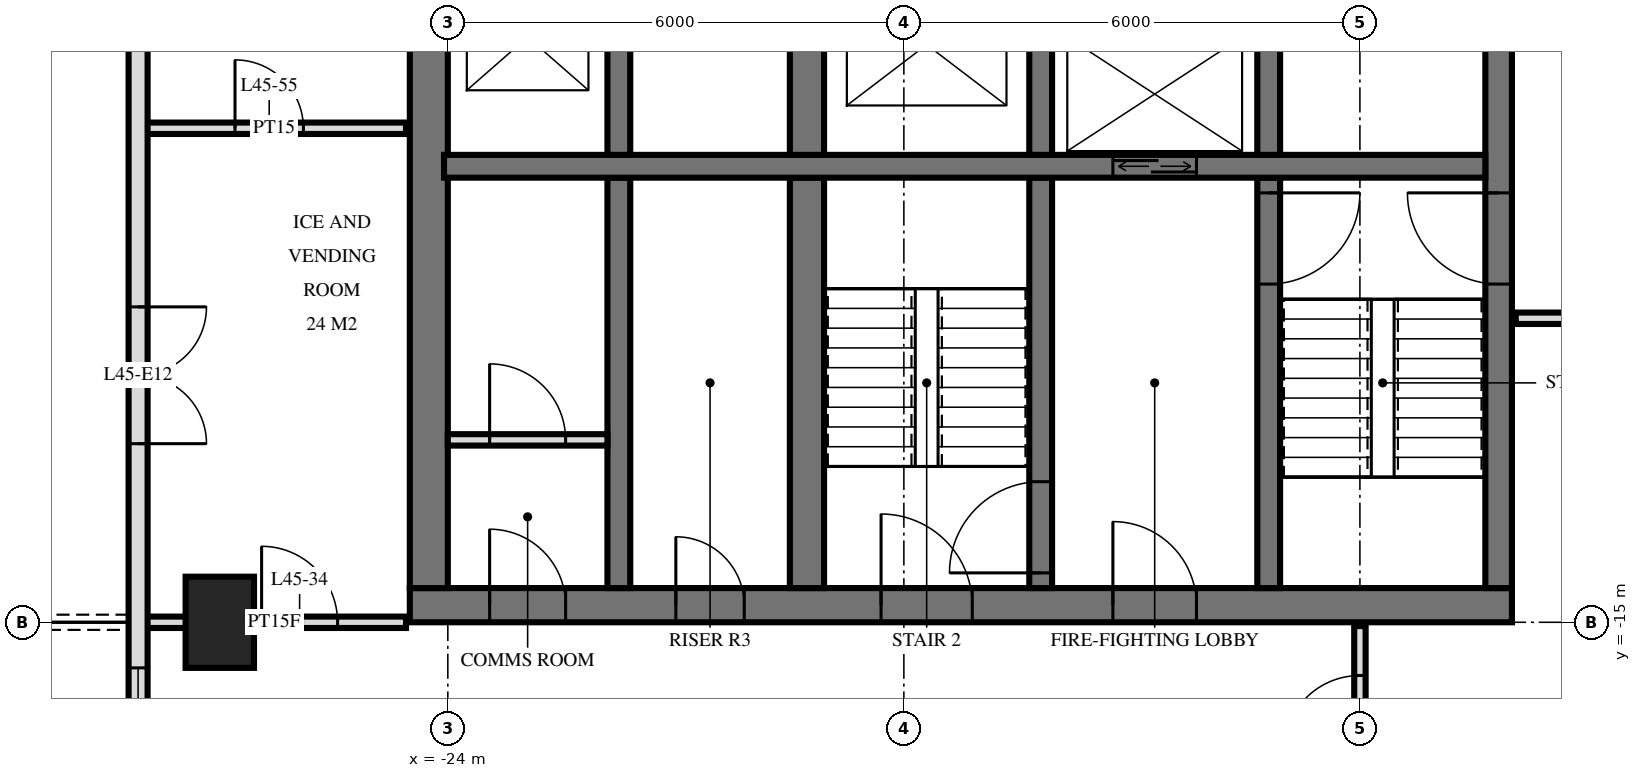
"""IFC4 building model, lengths in metres.
Left out: names, types, materials, properties, quantities, classifications, styles, units other than length and angle.
Written with IfcOpenShell. Run it as: python <this file> out.ifc"""

import sys

from ifc_helpers import new_model, si_unit, direction, frame, frame_2d, origin, origin_2d, place, context, subcontext, project, spatial, rectangle, extrude, element, fill, save


model = new_model("IFC4")
c1 = context("Model", 3, precision=1e-05, world=origin(), true_north=direction((0.0, 1.0)))
c2 = subcontext(c1, "Body", "Model", "MODEL_VIEW")
j1 = project(units=[si_unit("LENGTHUNIT", "METRE"), si_unit("PLANEANGLEUNIT", "RADIAN")], contexts=[c1])
p1 = place(None, origin())
s1 = spatial("IfcSite", under=j1, at=p1, CompositionType="ELEMENT")
p2 = place(p1, origin())
s2 = spatial("IfcBuilding", under=s1, at=p2, CompositionType="ELEMENT")
p3 = place(p2, frame((0.0, 0.0, 174.0)))
s3 = spatial("IfcBuildingStorey", under=s2, at=p3, CompositionType="ELEMENT", Elevation=174.0)
p4 = place(p3, frame((-27.0, -15.0, 0.0), z_axis=(0.0, 0.0, 1.0), x_axis=(0.0, 1.0, 0.0)))
e1 = element("IfcColumn", 1, at=p4, inside=s3, PredefinedType="COLUMN", context=c2, shape_type="SweptSolid", body=[
    extrude(rectangle(XDim=1.2, YDim=0.9, at=origin_2d()), origin(), (0.0, 0.0, 1.0), 3.6),
])
p5 = place(p3, frame((-24.5, -14.775, 0.0), z_axis=(0.0, 0.0, 1.0), x_axis=(1.0, 0.0, 0.0)))
e2 = element("IfcWall", 2, at=p5, inside=s3, PredefinedType="SHEAR", context=c2, shape_type="SweptSolid", body=[
    extrude(rectangle(XDim=14.5, YDim=0.45, at=frame_2d((7.25, 0.0))), origin(), (0.0, 0.0, 1.0), 3.6),
])
p6 = place(p5, frame((6.2, 0.0, 0.0)))
e3 = element("IfcOpeningElement", 3, at=p6, cuts=e2, PredefinedType="OPENING", context=c2, shape_type="SweptSolid", body=[
    extrude(rectangle(XDim=1.2, YDim=2.1, at=frame_2d((0.6, 1.05))), frame((0.0, 0.235, 0.0), z_axis=(0.0, -1.0, 0.0), x_axis=(1.0, 0.0, 0.0)), (0.0, 0.0, 1.0), 0.47),
])
p7 = place(p5, frame((9.25, 0.0, 0.0)))
e4 = element("IfcOpeningElement", 4, at=p7, cuts=e2, PredefinedType="OPENING", context=c2, shape_type="SweptSolid", body=[
    extrude(rectangle(XDim=1.1, YDim=2.1, at=frame_2d((0.55, 1.05))), frame((0.0, 0.235, 0.0), z_axis=(0.0, -1.0, 0.0), x_axis=(1.0, 0.0, 0.0)), (0.0, 0.0, 1.0), 0.47),
])
p8 = place(p5, frame((3.5, 0.0, 0.0)))
e5 = element("IfcOpeningElement", 5, at=p8, cuts=e2, PredefinedType="OPENING", context=c2, shape_type="SweptSolid", body=[
    extrude(rectangle(XDim=0.9, YDim=2.1, at=frame_2d((0.45, 1.05))), frame((0.0, 0.235, 0.0), z_axis=(0.0, -1.0, 0.0), x_axis=(1.0, 0.0, 0.0)), (0.0, 0.0, 1.0), 0.47),
])
p9 = place(p5, frame((1.05, 0.0, 0.0)))
e6 = element("IfcOpeningElement", 6, at=p9, cuts=e2, PredefinedType="OPENING", context=c2, shape_type="SweptSolid", body=[
    extrude(rectangle(XDim=1.0, YDim=2.1, at=frame_2d((0.5, 1.05))), frame((0.0, 0.235, 0.0), z_axis=(0.0, -1.0, 0.0), x_axis=(1.0, 0.0, 0.0)), (0.0, 0.0, 1.0), 0.47),
])
p10 = place(p3, frame((-10.175, -14.55, 0.0), z_axis=(0.0, 0.0, 1.0), x_axis=(0.0, 1.0, 0.0)))
e7 = element("IfcWall", 7, at=p10, inside=s3, PredefinedType="SHEAR", context=c2, shape_type="SweptSolid", body=[
    extrude(rectangle(XDim=14.1, YDim=0.35, at=frame_2d((7.05, 0.0))), origin(), (0.0, 0.0, 1.0), 3.6),
])
p11 = place(p10, frame((8.4, 0.0, 0.0)))
e8 = element("IfcOpeningElement", 8, at=p11, cuts=e7, PredefinedType="OPENING", context=c2, shape_type="SweptSolid", body=[
    extrude(rectangle(XDim=1.4, YDim=2.4, at=frame_2d((0.7, 1.2))), frame((0.0, 0.185, 0.0), z_axis=(0.0, -1.0, 0.0), x_axis=(1.0, 0.0, 0.0)), (0.0, 0.0, 1.0), 0.37),
])
p12 = place(p10, frame((10.0, 0.0, 0.0)))
e9 = element("IfcOpeningElement", 9, at=p12, cuts=e7, PredefinedType="OPENING", context=c2, shape_type="SweptSolid", body=[
    extrude(rectangle(XDim=1.4, YDim=2.4, at=frame_2d((0.7, 1.2))), frame((0.0, 0.185, 0.0), z_axis=(0.0, -1.0, 0.0), x_axis=(1.0, 0.0, 0.0)), (0.0, 0.0, 1.0), 0.37),
])
p13 = place(p10, frame((4.0, 0.0, 0.0)))
e10 = element("IfcOpeningElement", 10, at=p13, cuts=e7, PredefinedType="OPENING", context=c2, shape_type="SweptSolid", body=[
    extrude(rectangle(XDim=1.2, YDim=2.1, at=frame_2d((0.6, 1.05))), frame((0.0, 0.185, 0.0), z_axis=(0.0, -1.0, 0.0), x_axis=(1.0, 0.0, 0.0)), (0.0, 0.0, 1.0), 0.37),
])
p14 = place(p3, frame((-24.25, -14.55, 0.0), z_axis=(0.0, 0.0, 1.0), x_axis=(0.0, 1.0, 0.0)))
e11 = element("IfcWall", 11, at=p14, inside=s3, PredefinedType="SHEAR", context=c2, shape_type="SweptSolid", body=[
    extrude(rectangle(XDim=14.1, YDim=0.5, at=frame_2d((7.05, 0.0))), origin(), (0.0, 0.0, 1.0), 3.6),
])
p15 = place(p3, frame((-24.05, -9.0, 0.0), z_axis=(0.0, 0.0, 1.0), x_axis=(1.0, 0.0, 0.0)))
e12 = element("IfcWall", 12, at=p15, inside=s3, PredefinedType="SHEAR", context=c2, shape_type="SweptSolid", body=[
    extrude(rectangle(XDim=13.7, YDim=0.3, at=frame_2d((6.85, 0.0))), origin(), (0.0, 0.0, 1.0), 3.6),
])
p16 = place(p15, frame((8.8, 0.0, 0.0)))
e13 = element("IfcOpeningElement", 13, at=p16, cuts=e12, PredefinedType="OPENING", context=c2, shape_type="SweptSolid", body=[
    extrude(rectangle(XDim=1.1, YDim=2.1, at=frame_2d((0.55, 1.05))), frame((0.0, 0.16, 0.0), z_axis=(0.0, -1.0, 0.0), x_axis=(1.0, 0.0, 0.0)), (0.0, 0.0, 1.0), 0.32),
])
p17 = place(p3, frame((-13.2, -8.85, 0.0), z_axis=(0.0, 0.0, 1.0), x_axis=(0.0, 1.0, 0.0)))
e14 = element("IfcWall", 14, at=p17, inside=s3, PredefinedType="SHEAR", context=c2, shape_type="SweptSolid", body=[
    extrude(rectangle(XDim=2.3, YDim=0.3, at=frame_2d((1.15, 0.0))), origin(), (0.0, 0.0, 1.0), 3.6),
])
p18 = place(p3, frame((-13.2, -14.55, 0.0), z_axis=(0.0, 0.0, 1.0), x_axis=(0.0, 1.0, 0.0)))
e15 = element("IfcWall", 15, at=p18, inside=s3, PredefinedType="SHEAR", context=c2, shape_type="SweptSolid", body=[
    extrude(rectangle(XDim=5.4, YDim=0.3, at=frame_2d((2.7, 0.0))), origin(), (0.0, 0.0, 1.0), 3.6),
])
p19 = place(p18, frame((4.0, 0.0, 0.0)))
e16 = element("IfcOpeningElement", 16, at=p19, cuts=e15, PredefinedType="OPENING", context=c2, shape_type="SweptSolid", body=[
    extrude(rectangle(XDim=1.2, YDim=2.1, at=frame_2d((0.6, 1.05))), frame((0.0, 0.16, 0.0), z_axis=(0.0, -1.0, 0.0), x_axis=(1.0, 0.0, 0.0)), (0.0, 0.0, 1.0), 0.32),
])
p20 = place(p3, frame((-16.2, -8.85, 0.0), z_axis=(0.0, 0.0, 1.0), x_axis=(0.0, 1.0, 0.0)))
e17 = element("IfcWall", 17, at=p20, inside=s3, PredefinedType="SHEAR", context=c2, shape_type="SweptSolid", body=[
    extrude(rectangle(XDim=2.3, YDim=0.3, at=frame_2d((1.15, 0.0))), origin(), (0.0, 0.0, 1.0), 3.6),
])
p21 = place(p3, frame((-16.2, -14.55, 0.0), z_axis=(0.0, 0.0, 1.0), x_axis=(0.0, 1.0, 0.0)))
e18 = element("IfcWall", 18, at=p21, inside=s3, PredefinedType="SHEAR", context=c2, shape_type="SweptSolid", body=[
    extrude(rectangle(XDim=5.4, YDim=0.3, at=frame_2d((2.7, 0.0))), origin(), (0.0, 0.0, 1.0), 3.6),
])
p22 = place(p21, frame((0.2, 0.0, 0.0)))
e19 = element("IfcOpeningElement", 19, at=p22, cuts=e18, PredefinedType="OPENING", context=c2, shape_type="SweptSolid", body=[
    extrude(rectangle(XDim=1.2, YDim=2.1, at=frame_2d((0.6, 1.05))), frame((0.0, 0.16, 0.0), z_axis=(0.0, -1.0, 0.0), x_axis=(1.0, 0.0, 0.0)), (0.0, 0.0, 1.0), 0.32),
])
p23 = place(p3, frame((-19.275, -8.85, 0.0), z_axis=(0.0, 0.0, 1.0), x_axis=(0.0, 1.0, 0.0)))
e20 = element("IfcWall", 20, at=p23, inside=s3, PredefinedType="SHEAR", context=c2, shape_type="SweptSolid", body=[
    extrude(rectangle(XDim=2.3, YDim=0.45, at=frame_2d((1.15, 0.0))), origin(), (0.0, 0.0, 1.0), 3.6),
])
p24 = place(p3, frame((-19.275, -14.55, 0.0), z_axis=(0.0, 0.0, 1.0), x_axis=(0.0, 1.0, 0.0)))
e21 = element("IfcWall", 21, at=p24, inside=s3, PredefinedType="SHEAR", context=c2, shape_type="SweptSolid", body=[
    extrude(rectangle(XDim=5.4, YDim=0.45, at=frame_2d((2.7, 0.0))), origin(), (0.0, 0.0, 1.0), 3.6),
])
p25 = place(p3, frame((-21.75, -8.85, 0.0), z_axis=(0.0, 0.0, 1.0), x_axis=(0.0, 1.0, 0.0)))
e22 = element("IfcWall", 22, at=p25, inside=s3, PredefinedType="SHEAR", context=c2, shape_type="SweptSolid", body=[
    extrude(rectangle(XDim=2.3, YDim=0.3, at=frame_2d((1.15, 0.0))), origin(), (0.0, 0.0, 1.0), 3.6),
])
p26 = place(p3, frame((-21.75, -14.55, 0.0), z_axis=(0.0, 0.0, 1.0), x_axis=(0.0, 1.0, 0.0)))
e23 = element("IfcWall", 23, at=p26, inside=s3, PredefinedType="SHEAR", context=c2, shape_type="SweptSolid", body=[
    extrude(rectangle(XDim=5.4, YDim=0.3, at=frame_2d((2.7, 0.0))), origin(), (0.0, 0.0, 1.0), 3.6),
])
p27 = place(p3, frame((-28.075, -3.325, 0.0), z_axis=(0.0, 0.0, 1.0), x_axis=(0.0, -1.0, 0.0)))
e24 = element("IfcWall", 24, at=p27, inside=s3, PredefinedType="SOLIDWALL", context=c2, shape_type="SweptSolid", body=[
    extrude(rectangle(XDim=25.951, YDim=0.25, at=frame_2d((12.975, 0.0))), origin(), (0.0, 0.0, 1.0), 3.3),
])
p28 = place(p27, frame((7.525, 0.0, 0.0)))
e25 = element("IfcOpeningElement", 25, at=p28, cuts=e24, PredefinedType="OPENING", context=c2, shape_type="SweptSolid", body=[
    extrude(rectangle(XDim=1.8, YDim=2.4, at=frame_2d((0.9, 1.2))), frame((0.0, 0.135, 0.0), z_axis=(0.0, -1.0, 0.0), x_axis=(1.0, 0.0, 0.0)), (0.0, 0.0, 1.0), 0.27),
])
p29 = place(p27, frame((12.275, 0.0, 0.3)))
e26 = element("IfcOpeningElement", 26, at=p29, cuts=e24, PredefinedType="OPENING", context=c2, shape_type="SweptSolid", body=[
    extrude(rectangle(XDim=1.2, YDim=2.1, at=frame_2d((0.6, 1.05))), frame((0.0, 0.135, 0.0), z_axis=(0.0, -1.0, 0.0), x_axis=(1.0, 0.0, 0.0)), (0.0, 0.0, 1.0), 0.27),
])
p30 = place(p27, frame((14.975, 0.0, 0.3)))
e27 = element("IfcOpeningElement", 27, at=p30, cuts=e24, PredefinedType="OPENING", context=c2, shape_type="SweptSolid", body=[
    extrude(rectangle(XDim=2.4, YDim=2.1, at=frame_2d((1.2, 1.05))), frame((0.0, 0.135, 0.0), z_axis=(0.0, -1.0, 0.0), x_axis=(1.0, 0.0, 0.0)), (0.0, 0.0, 1.0), 0.27),
])
p31 = place(p27, frame((18.175, 0.0, 0.0)))
e28 = element("IfcOpeningElement", 28, at=p31, cuts=e24, PredefinedType="OPENING", context=c2, shape_type="SweptSolid", body=[
    extrude(rectangle(XDim=1.8, YDim=2.4, at=frame_2d((0.9, 1.2))), frame((0.0, 0.135, 0.0), z_axis=(0.0, -1.0, 0.0), x_axis=(1.0, 0.0, 0.0)), (0.0, 0.0, 1.0), 0.27),
])
p32 = place(p27, frame((21.075, 0.0, 0.0)))
e29 = element("IfcOpeningElement", 29, at=p32, cuts=e24, PredefinedType="OPENING", context=c2, shape_type="SweptSolid", body=[
    extrude(rectangle(XDim=1.8, YDim=2.4, at=frame_2d((0.9, 1.2))), frame((0.0, 0.135, 0.0), z_axis=(0.0, -1.0, 0.0), x_axis=(1.0, 0.0, 0.0)), (0.0, 0.0, 1.0), 0.27),
])
p33 = place(p27, frame((23.825, 0.0, 0.3)))
e30 = element("IfcOpeningElement", 30, at=p33, cuts=e24, PredefinedType="OPENING", context=c2, shape_type="SweptSolid", body=[
    extrude(rectangle(XDim=1.8, YDim=2.1, at=frame_2d((0.9, 1.05))), frame((0.0, 0.135, 0.0), z_axis=(0.0, -1.0, 0.0), x_axis=(1.0, 0.0, 0.0)), (0.0, 0.0, 1.0), 0.27),
])
p34 = place(p3, frame((-24.0, -12.6, 0.0), z_axis=(0.0, 0.0, 1.0), x_axis=(1.0, 0.0, 0.0)))
e31 = element("IfcWall", 31, at=p34, inside=s3, PredefinedType="PARTITIONING", context=c2, shape_type="SweptSolid", body=[
    extrude(rectangle(XDim=2.1, YDim=0.15, at=frame_2d((1.05, 0.0))), origin(), (0.0, 0.0, 1.0), 3.3),
])
p35 = place(p34, frame((0.55, 0.0, 0.0)))
e32 = element("IfcOpeningElement", 32, at=p35, cuts=e31, PredefinedType="OPENING", context=c2, shape_type="SweptSolid", body=[
    extrude(rectangle(XDim=1.0, YDim=2.1, at=frame_2d((0.5, 1.05))), frame((0.0, 0.085, 0.0), z_axis=(0.0, -1.0, 0.0), x_axis=(1.0, 0.0, 0.0)), (0.0, 0.0, 1.0), 0.17),
])
p36 = place(p3, frame((-12.0, -17.4, 0.0), z_axis=(0.0, 0.0, 1.0), x_axis=(0.0, 1.0, 0.0)))
e33 = element("IfcWall", 33, at=p36, inside=s3, PredefinedType="PARTITIONING", context=c2, shape_type="SweptSolid", body=[
    extrude(rectangle(XDim=2.35, YDim=0.15, at=frame_2d((1.175, 0.0))), origin(), (0.0, 0.0, 1.0), 3.32),
])
p37 = place(p36, frame((0.7, 0.0, 0.0)))
e34 = element("IfcOpeningElement", 34, at=p37, cuts=e33, PredefinedType="OPENING", context=c2, shape_type="SweptSolid", body=[
    extrude(rectangle(XDim=1.0, YDim=2.1, at=frame_2d((0.5, 1.05))), frame((0.0, 0.085, 0.0), z_axis=(0.0, -1.0, 0.0), x_axis=(1.0, 0.0, 0.0)), (0.0, 0.0, 1.0), 0.17),
])
p38 = place(p3, frame((-28.02, -15.0, 0.0), z_axis=(0.0, 0.0, 1.0), x_axis=(1.0, 0.0, 0.0)))
e35 = element("IfcWall", 35, at=p38, inside=s3, PredefinedType="PARTITIONING", context=c2, shape_type="SweptSolid", body=[
    extrude(rectangle(XDim=3.47, YDim=0.15, at=frame_2d((1.735, 0.0))), origin(), (0.0, 0.0, 1.0), 3.32),
])
p39 = place(p38, frame((1.57, 0.0, 0.0)))
e36 = element("IfcOpeningElement", 36, at=p39, cuts=e35, PredefinedType="OPENING", context=c2, shape_type="SweptSolid", body=[
    extrude(rectangle(XDim=1.0, YDim=2.1, at=frame_2d((0.5, 1.05))), frame((0.0, 0.085, 0.0), z_axis=(0.0, -1.0, 0.0), x_axis=(1.0, 0.0, 0.0)), (0.0, 0.0, 1.0), 0.17),
])
p40 = place(p3, frame((-9.95, -11.0, 0.0), z_axis=(0.0, 0.0, 1.0), x_axis=(1.0, 0.0, 0.0)))
e37 = element("IfcWall", 37, at=p40, inside=s3, PredefinedType="PARTITIONING", context=c2, shape_type="SweptSolid", body=[
    extrude(rectangle(XDim=19.9, YDim=0.15, at=frame_2d((9.95, 0.0))), origin(), (0.0, 0.0, 1.0), 3.32),
])
p41 = place(p40, frame((9.45, 0.0, 0.0)))
e38 = element("IfcOpeningElement", 38, at=p41, cuts=e37, PredefinedType="OPENING", context=c2, shape_type="SweptSolid", body=[
    extrude(rectangle(XDim=1.0, YDim=2.1, at=frame_2d((0.5, 1.05))), frame((0.0, 0.085, 0.0), z_axis=(0.0, -1.0, 0.0), x_axis=(1.0, 0.0, 0.0)), (0.0, 0.0, 1.0), 0.17),
])
p42 = place(p40, frame((3.45, 0.0, 0.0)))
e39 = element("IfcOpeningElement", 39, at=p42, cuts=e37, PredefinedType="OPENING", context=c2, shape_type="SweptSolid", body=[
    extrude(rectangle(XDim=1.0, YDim=2.1, at=frame_2d((0.5, 1.05))), frame((0.0, 0.085, 0.0), z_axis=(0.0, -1.0, 0.0), x_axis=(1.0, 0.0, 0.0)), (0.0, 0.0, 1.0), 0.17),
])
p43 = place(p3, frame((-28.02, -8.5, 0.0), z_axis=(0.0, 0.0, 1.0), x_axis=(1.0, 0.0, 0.0)))
e40 = element("IfcWall", 40, at=p43, inside=s3, PredefinedType="PARTITIONING", context=c2, shape_type="SweptSolid", body=[
    extrude(rectangle(XDim=3.47, YDim=0.15, at=frame_2d((1.735, 0.0))), origin(), (0.0, 0.0, 1.0), 3.32),
])
p44 = place(p43, frame((1.22, 0.0, 0.0)))
e41 = element("IfcOpeningElement", 41, at=p44, cuts=e40, PredefinedType="OPENING", context=c2, shape_type="SweptSolid", body=[
    extrude(rectangle(XDim=0.9, YDim=2.1, at=frame_2d((0.45, 1.05))), frame((0.0, 0.085, 0.0), z_axis=(0.0, -1.0, 0.0), x_axis=(1.0, 0.0, 0.0)), (0.0, 0.0, 1.0), 0.17),
])
p45 = place(p28, origin())
e42 = element("IfcDoor", 42, at=p45, inside=s3, OperationType="DOUBLE_DOOR_SINGLE_SWING", PredefinedType="DOOR", context=c2, shape_type="SweptSolid", body=[
    extrude(rectangle(XDim=1.8, YDim=2.4, at=frame_2d((0.9, 1.2))), frame((0.0, 0.025, 0.0), z_axis=(0.0, -1.0, 0.0), x_axis=(1.0, 0.0, 0.0)), (0.0, 0.0, 1.0), 0.05),
])
fill(e25, e42)
p46 = place(p29, origin())
e43 = element("IfcWindow", 43, at=p46, inside=s3, PartitioningType="SINGLE_PANEL", PredefinedType="WINDOW", context=c2, shape_type="SweptSolid", body=[
    extrude(rectangle(XDim=1.2, YDim=2.1, at=frame_2d((0.6, 1.05))), frame((0.0, 0.03, 0.0), z_axis=(0.0, -1.0, 0.0), x_axis=(1.0, 0.0, 0.0)), (0.0, 0.0, 1.0), 0.06),
])
fill(e26, e43)
p47 = place(p16, origin())
e44 = element("IfcDoor", 44, at=p47, inside=s3, OperationType="DOUBLE_DOOR_SLIDING", PredefinedType="USERDEFINED", context=c2, shape_type="SweptSolid", body=[
    extrude(rectangle(XDim=1.1, YDim=2.1, at=frame_2d((0.55, 1.05))), frame((0.0, 0.025, 0.0), z_axis=(0.0, -1.0, 0.0), x_axis=(1.0, 0.0, 0.0)), (0.0, 0.0, 1.0), 0.05),
])
fill(e13, e44)
p48 = place(p13, origin())
e45 = element("IfcDoor", 45, at=p48, inside=s3, OperationType="SINGLE_SWING_LEFT", PredefinedType="DOOR", context=c2, shape_type="SweptSolid", body=[
    extrude(rectangle(XDim=1.2, YDim=2.1, at=frame_2d((0.6, 1.05))), frame((0.0, 0.025, 0.0), z_axis=(0.0, -1.0, 0.0), x_axis=(1.0, 0.0, 0.0)), (0.0, 0.0, 1.0), 0.05),
])
fill(e10, e45)
p49 = place(p6, origin())
e46 = element("IfcDoor", 46, at=p49, inside=s3, OperationType="SINGLE_SWING_RIGHT", PredefinedType="DOOR", context=c2, shape_type="SweptSolid", body=[
    extrude(rectangle(XDim=1.2, YDim=2.1, at=frame_2d((0.6, 1.05))), frame((0.0, 0.025, 0.0), z_axis=(0.0, -1.0, 0.0), x_axis=(1.0, 0.0, 0.0)), (0.0, 0.0, 1.0), 0.05),
])
fill(e3, e46)
p50 = place(p7, origin())
e47 = element("IfcDoor", 47, at=p50, inside=s3, OperationType="SINGLE_SWING_RIGHT", PredefinedType="DOOR", context=c2, shape_type="SweptSolid", body=[
    extrude(rectangle(XDim=1.1, YDim=2.1, at=frame_2d((0.55, 1.05))), frame((0.0, 0.025, 0.0), z_axis=(0.0, -1.0, 0.0), x_axis=(1.0, 0.0, 0.0)), (0.0, 0.0, 1.0), 0.05),
])
fill(e4, e47)
p51 = place(p8, origin())
e48 = element("IfcDoor", 48, at=p51, inside=s3, OperationType="SINGLE_SWING_RIGHT", PredefinedType="DOOR", context=c2, shape_type="SweptSolid", body=[
    extrude(rectangle(XDim=0.9, YDim=2.1, at=frame_2d((0.45, 1.05))), frame((0.0, 0.025, 0.0), z_axis=(0.0, -1.0, 0.0), x_axis=(1.0, 0.0, 0.0)), (0.0, 0.0, 1.0), 0.05),
])
fill(e5, e48)
p52 = place(p9, origin())
e49 = element("IfcDoor", 49, at=p52, inside=s3, OperationType="SINGLE_SWING_RIGHT", PredefinedType="DOOR", context=c2, shape_type="SweptSolid", body=[
    extrude(rectangle(XDim=1.0, YDim=2.1, at=frame_2d((0.5, 1.05))), frame((0.0, 0.025, 0.0), z_axis=(0.0, -1.0, 0.0), x_axis=(1.0, 0.0, 0.0)), (0.0, 0.0, 1.0), 0.05),
])
fill(e6, e49)
p53 = place(p19, frame((0.6, 0.0, 0.0), z_axis=(0.0, 0.0, 1.0), x_axis=(-1.0, 0.0, 0.0)))
e50 = element("IfcDoor", 50, at=p53, inside=s3, OperationType="SINGLE_SWING_RIGHT", PredefinedType="DOOR", context=c2, shape_type="SweptSolid", body=[
    extrude(rectangle(XDim=1.2, YDim=2.1, at=frame_2d((0.0, 1.05))), frame((0.0, -0.025, 0.0), z_axis=(0.0, 1.0, 0.0), x_axis=(-1.0, 0.0, 0.0)), (0.0, 0.0, 1.0), 0.05),
])
fill(e16, e50)
p54 = place(p22, origin())
e51 = element("IfcDoor", 51, at=p54, inside=s3, OperationType="SINGLE_SWING_RIGHT", PredefinedType="DOOR", context=c2, shape_type="SweptSolid", body=[
    extrude(rectangle(XDim=1.2, YDim=2.1, at=frame_2d((0.6, 1.05))), frame((0.0, 0.025, 0.0), z_axis=(0.0, -1.0, 0.0), x_axis=(1.0, 0.0, 0.0)), (0.0, 0.0, 1.0), 0.05),
])
fill(e19, e51)
p55 = place(p35, origin())
e52 = element("IfcDoor", 52, at=p55, inside=s3, OperationType="SINGLE_SWING_RIGHT", PredefinedType="DOOR", context=c2, shape_type="SweptSolid", body=[
    extrude(rectangle(XDim=1.0, YDim=2.1, at=frame_2d((0.5, 1.05))), frame((0.0, 0.025, 0.0), z_axis=(0.0, -1.0, 0.0), x_axis=(1.0, 0.0, 0.0)), (0.0, 0.0, 1.0), 0.05),
])
fill(e32, e52)
p56 = place(p37, origin())
e53 = element("IfcDoor", 53, at=p56, inside=s3, OperationType="SINGLE_SWING_RIGHT", PredefinedType="DOOR", context=c2, shape_type="SweptSolid", body=[
    extrude(rectangle(XDim=1.0, YDim=2.1, at=frame_2d((0.5, 1.05))), frame((0.0, 0.025, 0.0), z_axis=(0.0, -1.0, 0.0), x_axis=(1.0, 0.0, 0.0)), (0.0, 0.0, 1.0), 0.05),
])
fill(e34, e53)
p57 = place(p39, origin())
e54 = element("IfcDoor", 54, at=p57, inside=s3, OperationType="SINGLE_SWING_RIGHT", PredefinedType="DOOR", context=c2, shape_type="SweptSolid", body=[
    extrude(rectangle(XDim=1.0, YDim=2.1, at=frame_2d((0.5, 1.05))), frame((0.0, 0.025, 0.0), z_axis=(0.0, -1.0, 0.0), x_axis=(1.0, 0.0, 0.0)), (0.0, 0.0, 1.0), 0.05),
])
fill(e36, e54)
p58 = place(p44, origin())
e55 = element("IfcDoor", 55, at=p58, inside=s3, OperationType="SINGLE_SWING_RIGHT", PredefinedType="DOOR", context=c2, shape_type="SweptSolid", body=[
    extrude(rectangle(XDim=0.9, YDim=2.1, at=frame_2d((0.45, 1.05))), frame((0.0, 0.025, 0.0), z_axis=(0.0, -1.0, 0.0), x_axis=(1.0, 0.0, 0.0)), (0.0, 0.0, 1.0), 0.05),
])
fill(e41, e55)
save(model, sys.argv[1])
